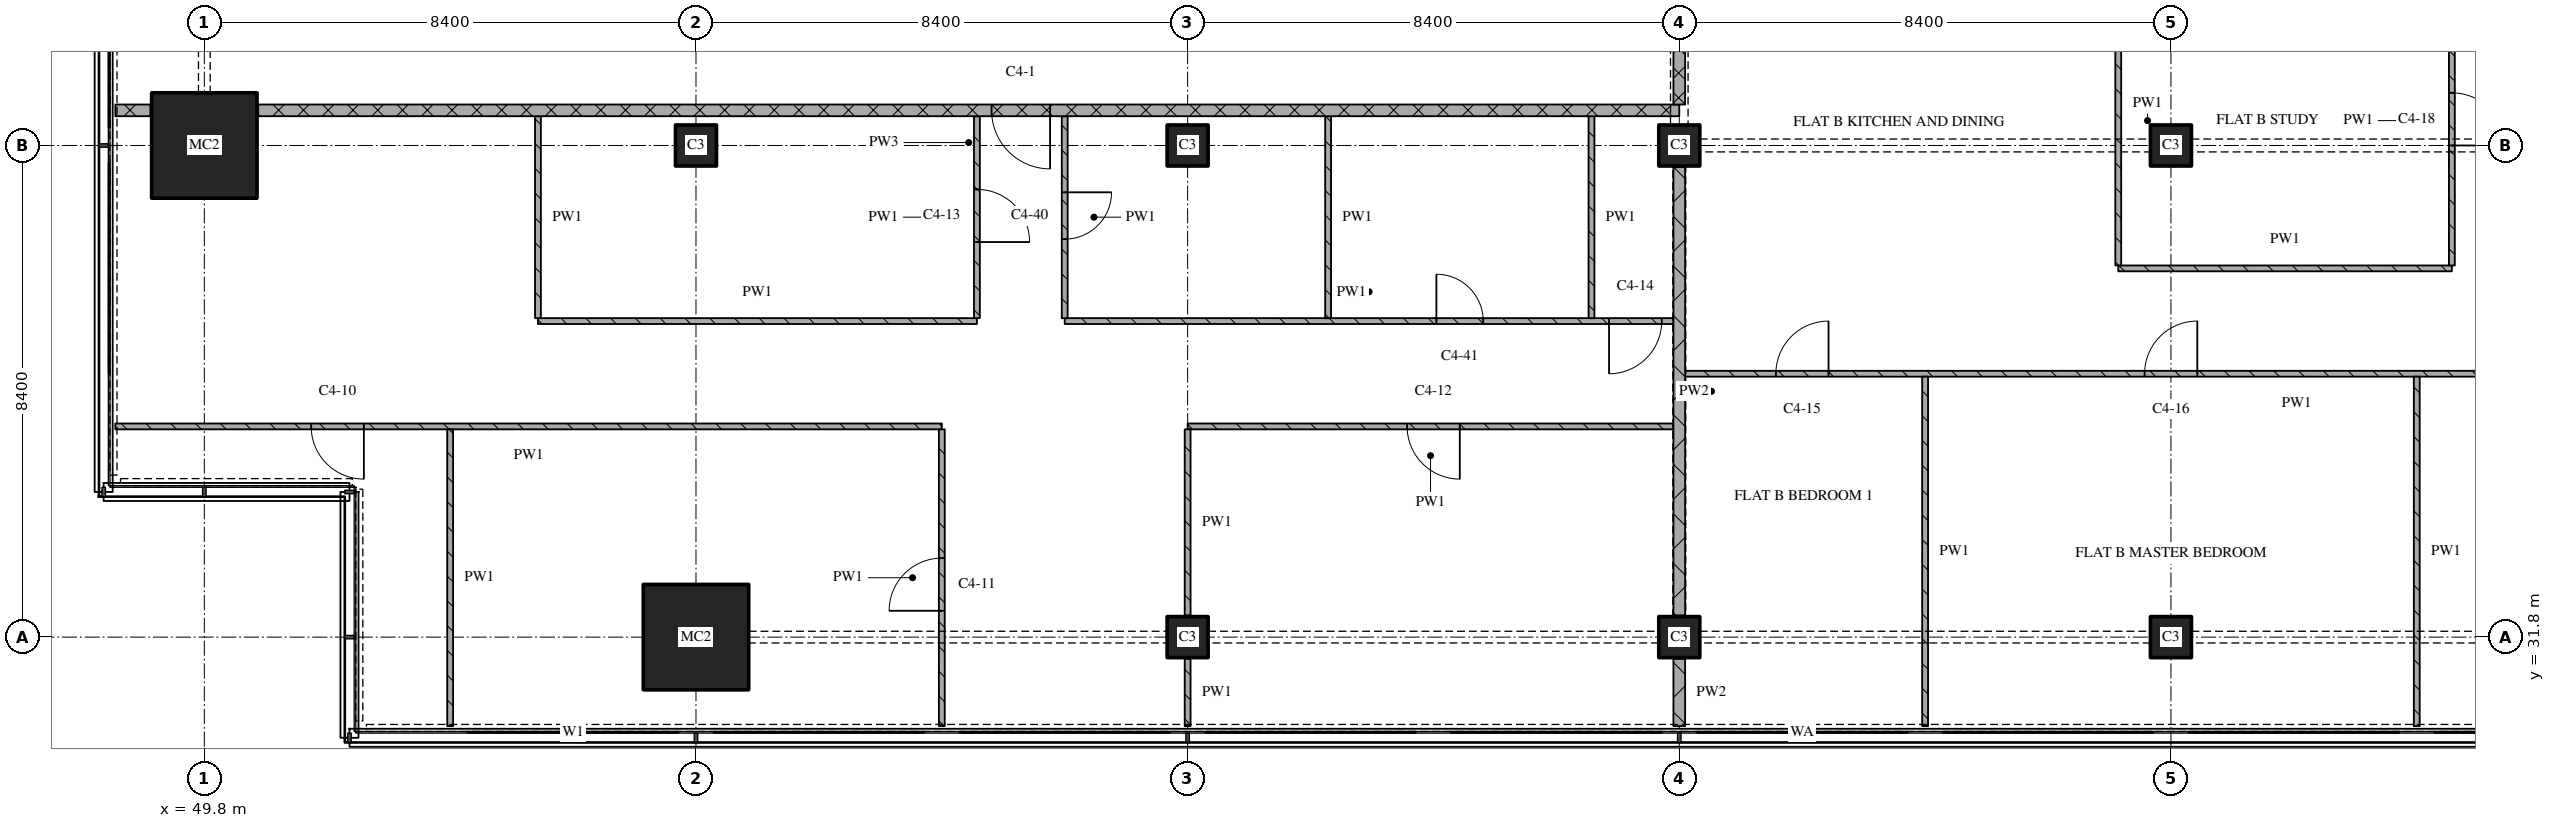
"""IFC4 building model, lengths in metres.
Left out: names, types, materials, properties, quantities, classifications, styles, units other than length and angle.
Written with IfcOpenShell. Run it as: python <this file> out.ifc"""

import sys

from ifc_helpers import new_model, si_unit, direction, frame, frame_2d, origin, origin_2d, place, context, subcontext, project, spatial, rectangle, extrude, element, fill, save


model = new_model("IFC4")
c1 = context("Model", 3, precision=1e-05, world=origin(), true_north=direction((0.0, 1.0)))
c2 = subcontext(c1, "Body", "Model", "MODEL_VIEW")
j1 = project(units=[si_unit("LENGTHUNIT", "METRE"), si_unit("PLANEANGLEUNIT", "RADIAN")], contexts=[c1])
p1 = place(None, origin())
s1 = spatial("IfcSite", under=j1, at=p1, CompositionType="ELEMENT")
p2 = place(p1, origin())
s2 = spatial("IfcBuilding", under=s1, at=p2, CompositionType="ELEMENT")
p3 = place(p2, frame((0.0, 0.0, 183.45)))
s3 = spatial("IfcBuildingStorey", under=s2, at=p3, CompositionType="ELEMENT", Elevation=183.45)
for number, where, z_axis, x_axis in (
    (1, (49.8, 40.2, 0.0), (0.0, 0.0, 1.0), (1.0, 0.0, 0.0)),
    (2, (58.2, 31.8, 0.0), (0.0, 0.0, 1.0), (1.0, 0.0, 0.0)),
):
    element("IfcColumn", number, at=place(p3, frame(where, z_axis=z_axis, x_axis=x_axis)), inside=s3, PredefinedType="COLUMN", context=c2, shape_type="SweptSolid", body=[
        extrude(rectangle(XDim=1.8, YDim=1.8, at=origin_2d()), origin(), (0.0, 0.0, 1.0), 3.6),
    ])
for number, where, z_axis, x_axis in (
    (3, (58.2, 40.2, 0.0), (0.0, 0.0, 1.0), (1.0, 0.0, 0.0)),
    (4, (66.6, 31.8, 0.0), (0.0, 0.0, 1.0), (1.0, 0.0, 0.0)),
    (5, (66.6, 40.2, 0.0), (0.0, 0.0, 1.0), (1.0, 0.0, 0.0)),
    (6, (75.0, 31.8, 0.0), (0.0, 0.0, 1.0), (1.0, 0.0, 0.0)),
    (7, (75.0, 40.2, 0.0), (0.0, 0.0, 1.0), (1.0, 0.0, 0.0)),
    (8, (83.4, 31.8, 0.0), (0.0, 0.0, 1.0), (1.0, 0.0, 0.0)),
    (9, (83.4, 40.2, 0.0), (0.0, 0.0, 1.0), (1.0, 0.0, 0.0)),
):
    element("IfcColumn", number, at=place(p3, frame(where, z_axis=z_axis, x_axis=x_axis)), inside=s3, PredefinedType="COLUMN", context=c2, shape_type="SweptSolid", body=[
        extrude(rectangle(XDim=0.7, YDim=0.7, at=origin_2d()), origin(), (0.0, 0.0, 1.0), 3.6),
    ])
p4 = place(p3, frame((62.4, 35.4, 0.0), z_axis=(0.0, 0.0, 1.0), x_axis=(-1.0, 0.0, 0.0)))
e10 = element("IfcWall", 10, at=p4, inside=s3, PredefinedType="PARTITIONING", context=c2, shape_type="SweptSolid", body=[
    extrude(rectangle(XDim=14.12, YDim=0.1, at=frame_2d((7.06, 0.0))), origin(), (0.0, 0.0, 1.0), 3.32),
])
p5 = place(p4, frame((9.875, 0.0, 0.0)))
e11 = element("IfcOpeningElement", 11, at=p5, cuts=e10, PredefinedType="OPENING", context=c2, shape_type="SweptSolid", body=[
    extrude(rectangle(XDim=0.9, YDim=2.1, at=frame_2d((0.45, 1.05))), frame((0.0, 0.06, 0.0), z_axis=(0.0, -1.0, 0.0), x_axis=(1.0, 0.0, 0.0)), (0.0, 0.0, 1.0), 0.12),
])
p6 = place(p3, frame((74.9, 35.4, 0.0), z_axis=(0.0, 0.0, 1.0), x_axis=(-1.0, 0.0, 0.0)))
e12 = element("IfcWall", 12, at=p6, inside=s3, PredefinedType="PARTITIONING", context=c2, shape_type="SweptSolid", body=[
    extrude(rectangle(XDim=8.3, YDim=0.1, at=frame_2d((4.15, 0.0))), origin(), (0.0, 0.0, 1.0), 3.32),
])
p7 = place(p6, frame((3.65, 0.0, 0.0)))
e13 = element("IfcOpeningElement", 13, at=p7, cuts=e12, PredefinedType="OPENING", context=c2, shape_type="SweptSolid", body=[
    extrude(rectangle(XDim=0.9, YDim=2.1, at=frame_2d((0.45, 1.05))), frame((0.0, 0.06, 0.0), z_axis=(0.0, -1.0, 0.0), x_axis=(1.0, 0.0, 0.0)), (0.0, 0.0, 1.0), 0.12),
])
p8 = place(p3, frame((96.0, 36.3, 0.0), z_axis=(0.0, 0.0, 1.0), x_axis=(-1.0, 0.0, 0.0)))
e14 = element("IfcWall", 14, at=p8, inside=s3, PredefinedType="PARTITIONING", context=c2, shape_type="SweptSolid", body=[
    extrude(rectangle(XDim=20.9, YDim=0.1, at=frame_2d((10.45, 0.0))), origin(), (0.0, 0.0, 1.0), 3.32),
])
p9 = place(p8, frame((12.15, 0.0, 0.0)))
e15 = element("IfcOpeningElement", 15, at=p9, cuts=e14, PredefinedType="OPENING", context=c2, shape_type="SweptSolid", body=[
    extrude(rectangle(XDim=0.9, YDim=2.1, at=frame_2d((0.45, 1.05))), frame((0.0, 0.06, 0.0), z_axis=(0.0, -1.0, 0.0), x_axis=(1.0, 0.0, 0.0)), (0.0, 0.0, 1.0), 0.12),
])
p10 = place(p8, frame((18.45, 0.0, 0.0)))
e16 = element("IfcOpeningElement", 16, at=p10, cuts=e14, PredefinedType="OPENING", context=c2, shape_type="SweptSolid", body=[
    extrude(rectangle(XDim=0.9, YDim=2.1, at=frame_2d((0.45, 1.05))), frame((0.0, 0.06, 0.0), z_axis=(0.0, -1.0, 0.0), x_axis=(1.0, 0.0, 0.0)), (0.0, 0.0, 1.0), 0.12),
])
p11 = place(p3, frame((55.5, 37.2, 0.0), z_axis=(0.0, 0.0, 1.0), x_axis=(1.0, 0.0, 0.0)))
e17 = element("IfcWall", 17, at=p11, inside=s3, PredefinedType="PARTITIONING", context=c2, shape_type="SweptSolid", body=[
    extrude(rectangle(XDim=7.5, YDim=0.1, at=frame_2d((3.75, 0.0))), origin(), (0.0, 0.0, 1.0), 3.32),
])
p12 = place(p3, frame((64.5, 37.2, 0.0), z_axis=(0.0, 0.0, 1.0), x_axis=(1.0, 0.0, 0.0)))
e18 = element("IfcWall", 18, at=p12, inside=s3, PredefinedType="PARTITIONING", context=c2, shape_type="SweptSolid", body=[
    extrude(rectangle(XDim=10.4, YDim=0.1, at=frame_2d((5.2, 0.0))), origin(), (0.0, 0.0, 1.0), 3.32),
])
p13 = place(p12, frame((6.35, 0.0, 0.0)))
e19 = element("IfcOpeningElement", 19, at=p13, cuts=e18, PredefinedType="OPENING", context=c2, shape_type="SweptSolid", body=[
    extrude(rectangle(XDim=0.8, YDim=2.1, at=frame_2d((0.4, 1.05))), frame((0.0, 0.06, 0.0), z_axis=(0.0, -1.0, 0.0), x_axis=(1.0, 0.0, 0.0)), (0.0, 0.0, 1.0), 0.12),
])
p14 = place(p12, frame((9.3, 0.0, 0.0)))
e20 = element("IfcOpeningElement", 20, at=p14, cuts=e18, PredefinedType="OPENING", context=c2, shape_type="SweptSolid", body=[
    extrude(rectangle(XDim=0.9, YDim=2.1, at=frame_2d((0.45, 1.05))), frame((0.0, 0.06, 0.0), z_axis=(0.0, -1.0, 0.0), x_axis=(1.0, 0.0, 0.0)), (0.0, 0.0, 1.0), 0.12),
])
p15 = place(p3, frame((82.5, 38.1, 0.0), z_axis=(0.0, 0.0, 1.0), x_axis=(1.0, 0.0, 0.0)))
e21 = element("IfcWall", 21, at=p15, inside=s3, PredefinedType="PARTITIONING", context=c2, shape_type="SweptSolid", body=[
    extrude(rectangle(XDim=5.7, YDim=0.1, at=frame_2d((2.85, 0.0))), origin(), (0.0, 0.0, 1.0), 3.32),
])
p16 = place(p3, frame((48.28, 40.8, 0.0), z_axis=(0.0, 0.0, 1.0), x_axis=(1.0, 0.0, 0.0)))
e22 = element("IfcWall", 22, at=p16, inside=s3, PredefinedType="PARTITIONING", context=c2, shape_type="SweptSolid", body=[
    extrude(rectangle(XDim=0.6, YDim=0.2, at=frame_2d((0.3, 0.0))), origin(), (0.0, 0.0, 1.0), 3.32),
])
p17 = place(p3, frame((75.0, 40.8, 0.0), z_axis=(0.0, 0.0, 1.0), x_axis=(-1.0, 0.0, 0.0)))
e23 = element("IfcWall", 23, at=p17, inside=s3, PredefinedType="PARTITIONING", context=c2, shape_type="SweptSolid", body=[
    extrude(rectangle(XDim=24.28, YDim=0.2, at=frame_2d((12.14, 0.0))), origin(), (0.0, 0.0, 1.0), 3.32),
])
p18 = place(p17, frame((10.75, 0.0, 0.0)))
e24 = element("IfcOpeningElement", 24, at=p18, cuts=e23, PredefinedType="OPENING", context=c2, shape_type="SweptSolid", body=[
    extrude(rectangle(XDim=1.0, YDim=2.1, at=frame_2d((0.5, 1.05))), frame((0.0, 0.11, 0.0), z_axis=(0.0, -1.0, 0.0), x_axis=(1.0, 0.0, 0.0)), (0.0, 0.0, 1.0), 0.22),
])
p19 = place(p3, frame((54.0, 35.35, 0.0), z_axis=(0.0, 0.0, 1.0), x_axis=(0.0, -1.0, 0.0)))
e25 = element("IfcWall", 25, at=p19, inside=s3, PredefinedType="PARTITIONING", context=c2, shape_type="SweptSolid", body=[
    extrude(rectangle(XDim=5.07, YDim=0.1, at=frame_2d((2.535, 0.0))), origin(), (0.0, 0.0, 1.0), 3.32),
])
p20 = place(p3, frame((55.5, 40.7, 0.0), z_axis=(0.0, 0.0, 1.0), x_axis=(0.0, -1.0, 0.0)))
e26 = element("IfcWall", 26, at=p20, inside=s3, PredefinedType="PARTITIONING", context=c2, shape_type="SweptSolid", body=[
    extrude(rectangle(XDim=3.45, YDim=0.1, at=frame_2d((1.725, 0.0))), origin(), (0.0, 0.0, 1.0), 3.32),
])
p21 = place(p3, frame((62.4, 30.28, 0.0), z_axis=(0.0, 0.0, 1.0), x_axis=(0.0, 1.0, 0.0)))
e27 = element("IfcWall", 27, at=p21, inside=s3, PredefinedType="PARTITIONING", context=c2, shape_type="SweptSolid", body=[
    extrude(rectangle(XDim=5.07, YDim=0.1, at=frame_2d((2.535, 0.0))), origin(), (0.0, 0.0, 1.0), 3.32),
])
p22 = place(p21, frame((1.97, 0.0, 0.0)))
e28 = element("IfcOpeningElement", 28, at=p22, cuts=e27, PredefinedType="OPENING", context=c2, shape_type="SweptSolid", body=[
    extrude(rectangle(XDim=0.9, YDim=2.1, at=frame_2d((0.45, 1.05))), frame((0.0, 0.06, 0.0), z_axis=(0.0, -1.0, 0.0), x_axis=(1.0, 0.0, 0.0)), (0.0, 0.0, 1.0), 0.12),
])
p23 = place(p3, frame((63.0, 37.25, 0.0), z_axis=(0.0, 0.0, 1.0), x_axis=(0.0, 1.0, 0.0)))
e29 = element("IfcWall", 29, at=p23, inside=s3, PredefinedType="PARTITIONING", context=c2, shape_type="SweptSolid", body=[
    extrude(rectangle(XDim=3.45, YDim=0.1, at=frame_2d((1.725, 0.0))), origin(), (0.0, 0.0, 1.0), 3.32),
])
p24 = place(p23, frame((1.3, 0.0, 0.0)))
e30 = element("IfcOpeningElement", 30, at=p24, cuts=e29, PredefinedType="OPENING", context=c2, shape_type="SweptSolid", body=[
    extrude(rectangle(XDim=0.9, YDim=2.1, at=frame_2d((0.45, 1.05))), frame((0.0, 0.06, 0.0), z_axis=(0.0, -1.0, 0.0), x_axis=(1.0, 0.0, 0.0)), (0.0, 0.0, 1.0), 0.12),
])
p25 = place(p3, frame((64.5, 40.7, 0.0), z_axis=(0.0, 0.0, 1.0), x_axis=(0.0, -1.0, 0.0)))
e31 = element("IfcWall", 31, at=p25, inside=s3, PredefinedType="PARTITIONING", context=c2, shape_type="SweptSolid", body=[
    extrude(rectangle(XDim=3.45, YDim=0.1, at=frame_2d((1.725, 0.0))), origin(), (0.0, 0.0, 1.0), 3.32),
])
p26 = place(p25, frame((1.3, 0.0, 0.0)))
e32 = element("IfcOpeningElement", 32, at=p26, cuts=e31, PredefinedType="OPENING", context=c2, shape_type="SweptSolid", body=[
    extrude(rectangle(XDim=0.8, YDim=2.1, at=frame_2d((0.4, 1.05))), frame((0.0, 0.06, 0.0), z_axis=(0.0, -1.0, 0.0), x_axis=(1.0, 0.0, 0.0)), (0.0, 0.0, 1.0), 0.12),
])
p27 = place(p3, frame((66.6, 31.43, 0.0), z_axis=(0.0, 0.0, 1.0), x_axis=(0.0, -1.0, 0.0)))
e33 = element("IfcWall", 33, at=p27, inside=s3, PredefinedType="PARTITIONING", context=c2, shape_type="SweptSolid", body=[
    extrude(rectangle(XDim=1.15, YDim=0.1, at=frame_2d((0.575, 0.0))), origin(), (0.0, 0.0, 1.0), 3.32),
])
p28 = place(p3, frame((66.6, 35.35, 0.0), z_axis=(0.0, 0.0, 1.0), x_axis=(0.0, -1.0, 0.0)))
e34 = element("IfcWall", 34, at=p28, inside=s3, PredefinedType="PARTITIONING", context=c2, shape_type="SweptSolid", body=[
    extrude(rectangle(XDim=3.18, YDim=0.1, at=frame_2d((1.59, 0.0))), origin(), (0.0, 0.0, 1.0), 3.32),
])
for number, where, z_axis, x_axis in (
    (35, (69.0, 40.7, 0.0), (0.0, 0.0, 1.0), (0.0, -1.0, 0.0)),
    (36, (73.5, 40.7, 0.0), (0.0, 0.0, 1.0), (0.0, -1.0, 0.0)),
):
    element("IfcWall", number, at=place(p3, frame(where, z_axis=z_axis, x_axis=x_axis)), inside=s3, PredefinedType="PARTITIONING", context=c2, shape_type="SweptSolid", body=[
        extrude(rectangle(XDim=3.45, YDim=0.1, at=frame_2d((1.725, 0.0))), origin(), (0.0, 0.0, 1.0), 3.32),
    ])
p29 = place(p3, frame((75.0, 43.1, 0.0), z_axis=(0.0, 0.0, 1.0), x_axis=(0.0, -1.0, 0.0)))
e37 = element("IfcWall", 37, at=p29, inside=s3, PredefinedType="PARTITIONING", context=c2, shape_type="SweptSolid", body=[
    extrude(rectangle(XDim=2.2, YDim=0.2, at=frame_2d((1.1, 0.0))), origin(), (0.0, 0.0, 1.0), 2.43),
])
p30 = place(p3, frame((75.0, 31.43, 0.0), z_axis=(0.0, 0.0, 1.0), x_axis=(0.0, -1.0, 0.0)))
e38 = element("IfcWall", 38, at=p30, inside=s3, PredefinedType="PARTITIONING", context=c2, shape_type="SweptSolid", body=[
    extrude(rectangle(XDim=1.15, YDim=0.2, at=frame_2d((0.575, 0.0))), origin(), (0.0, 0.0, 1.0), 3.32),
])
p31 = place(p3, frame((75.0, 39.83, 0.0), z_axis=(0.0, 0.0, 1.0), x_axis=(0.0, -1.0, 0.0)))
e39 = element("IfcWall", 39, at=p31, inside=s3, PredefinedType="PARTITIONING", context=c2, shape_type="SweptSolid", body=[
    extrude(rectangle(XDim=7.66, YDim=0.2, at=frame_2d((3.83, 0.0))), origin(), (0.0, 0.0, 1.0), 2.72),
])
p32 = place(p3, frame((79.2, 36.25, 0.0), z_axis=(0.0, 0.0, 1.0), x_axis=(0.0, -1.0, 0.0)))
e40 = element("IfcWall", 40, at=p32, inside=s3, PredefinedType="PARTITIONING", context=c2, shape_type="SweptSolid", body=[
    extrude(rectangle(XDim=5.97, YDim=0.1, at=frame_2d((2.985, 0.0))), origin(), (0.0, 0.0, 1.0), 3.32),
])
p33 = place(p3, frame((82.5, 43.1, 0.0), z_axis=(0.0, 0.0, 1.0), x_axis=(0.0, -1.0, 0.0)))
e41 = element("IfcWall", 41, at=p33, inside=s3, PredefinedType="PARTITIONING", context=c2, shape_type="SweptSolid", body=[
    extrude(rectangle(XDim=4.95, YDim=0.1, at=frame_2d((2.475, 0.0))), origin(), (0.0, 0.0, 1.0), 3.32),
])
p34 = place(p3, frame((87.6, 36.25, 0.0), z_axis=(0.0, 0.0, 1.0), x_axis=(0.0, -1.0, 0.0)))
e42 = element("IfcWall", 42, at=p34, inside=s3, PredefinedType="PARTITIONING", context=c2, shape_type="SweptSolid", body=[
    extrude(rectangle(XDim=5.97, YDim=0.1, at=frame_2d((2.985, 0.0))), origin(), (0.0, 0.0, 1.0), 3.32),
])
p35 = place(p3, frame((88.2, 38.15, 0.0), z_axis=(0.0, 0.0, 1.0), x_axis=(0.0, 1.0, 0.0)))
e43 = element("IfcWall", 43, at=p35, inside=s3, PredefinedType="PARTITIONING", context=c2, shape_type="SweptSolid", body=[
    extrude(rectangle(XDim=4.95, YDim=0.1, at=frame_2d((2.475, 0.0))), origin(), (0.0, 0.0, 1.0), 3.32),
])
p36 = place(p35, frame((2.05, 0.0, 0.0)))
e44 = element("IfcOpeningElement", 44, at=p36, cuts=e43, PredefinedType="OPENING", context=c2, shape_type="SweptSolid", body=[
    extrude(rectangle(XDim=0.9, YDim=2.1, at=frame_2d((0.45, 1.05))), frame((0.0, 0.06, 0.0), z_axis=(0.0, -1.0, 0.0), x_axis=(1.0, 0.0, 0.0)), (0.0, 0.0, 1.0), 0.12),
])
p37 = place(p5, origin())
e45 = element("IfcDoor", 45, at=p37, inside=s3, OperationType="SINGLE_SWING_LEFT", PredefinedType="DOOR", context=c2, shape_type="SweptSolid", body=[
    extrude(rectangle(XDim=0.9, YDim=2.1, at=frame_2d((0.45, 1.05))), frame((0.0, 0.025, 0.0), z_axis=(0.0, -1.0, 0.0), x_axis=(1.0, 0.0, 0.0)), (0.0, 0.0, 1.0), 0.05),
])
fill(e11, e45)
p38 = place(p7, origin())
e46 = element("IfcDoor", 46, at=p38, inside=s3, OperationType="SINGLE_SWING_LEFT", PredefinedType="DOOR", context=c2, shape_type="SweptSolid", body=[
    extrude(rectangle(XDim=0.9, YDim=2.1, at=frame_2d((0.45, 1.05))), frame((0.0, 0.025, 0.0), z_axis=(0.0, -1.0, 0.0), x_axis=(1.0, 0.0, 0.0)), (0.0, 0.0, 1.0), 0.05),
])
fill(e13, e46)
p39 = place(p9, origin())
e47 = element("IfcDoor", 47, at=p39, inside=s3, OperationType="SINGLE_SWING_RIGHT", PredefinedType="DOOR", context=c2, shape_type="SweptSolid", body=[
    extrude(rectangle(XDim=0.9, YDim=2.1, at=frame_2d((0.45, 1.05))), frame((0.0, 0.025, 0.0), z_axis=(0.0, -1.0, 0.0), x_axis=(1.0, 0.0, 0.0)), (0.0, 0.0, 1.0), 0.05),
])
fill(e15, e47)
p40 = place(p10, origin())
e48 = element("IfcDoor", 48, at=p40, inside=s3, OperationType="SINGLE_SWING_RIGHT", PredefinedType="DOOR", context=c2, shape_type="SweptSolid", body=[
    extrude(rectangle(XDim=0.9, YDim=2.1, at=frame_2d((0.45, 1.05))), frame((0.0, 0.025, 0.0), z_axis=(0.0, -1.0, 0.0), x_axis=(1.0, 0.0, 0.0)), (0.0, 0.0, 1.0), 0.05),
])
fill(e16, e48)
p41 = place(p13, origin())
e49 = element("IfcDoor", 49, at=p41, inside=s3, OperationType="SINGLE_SWING_LEFT", PredefinedType="DOOR", context=c2, shape_type="SweptSolid", body=[
    extrude(rectangle(XDim=0.8, YDim=2.1, at=frame_2d((0.4, 1.05))), frame((0.0, 0.025, 0.0), z_axis=(0.0, -1.0, 0.0), x_axis=(1.0, 0.0, 0.0)), (0.0, 0.0, 1.0), 0.05),
])
fill(e19, e49)
p42 = place(p14, origin())
e50 = element("IfcDoor", 50, at=p42, inside=s3, OperationType="SINGLE_SWING_RIGHT", PredefinedType="DOOR", context=c2, shape_type="SweptSolid", body=[
    extrude(rectangle(XDim=0.9, YDim=2.1, at=frame_2d((0.45, 1.05))), frame((0.0, 0.025, 0.0), z_axis=(0.0, -1.0, 0.0), x_axis=(1.0, 0.0, 0.0)), (0.0, 0.0, 1.0), 0.05),
])
fill(e20, e50)
p43 = place(p18, origin())
e51 = element("IfcDoor", 51, at=p43, inside=s3, OperationType="SINGLE_SWING_LEFT", PredefinedType="DOOR", context=c2, shape_type="SweptSolid", body=[
    extrude(rectangle(XDim=1.0, YDim=2.1, at=frame_2d((0.5, 1.05))), frame((0.0, 0.025, 0.0), z_axis=(0.0, -1.0, 0.0), x_axis=(1.0, 0.0, 0.0)), (0.0, 0.0, 1.0), 0.05),
])
fill(e24, e51)
p44 = place(p22, origin())
e52 = element("IfcDoor", 52, at=p44, inside=s3, OperationType="SINGLE_SWING_LEFT", PredefinedType="DOOR", context=c2, shape_type="SweptSolid", body=[
    extrude(rectangle(XDim=0.9, YDim=2.1, at=frame_2d((0.45, 1.05))), frame((0.0, 0.025, 0.0), z_axis=(0.0, -1.0, 0.0), x_axis=(1.0, 0.0, 0.0)), (0.0, 0.0, 1.0), 0.05),
])
fill(e28, e52)
p45 = place(p24, origin())
e53 = element("IfcDoor", 53, at=p45, inside=s3, OperationType="SINGLE_SWING_RIGHT", PredefinedType="DOOR", context=c2, shape_type="SweptSolid", body=[
    extrude(rectangle(XDim=0.9, YDim=2.1, at=frame_2d((0.45, 1.05))), frame((0.0, 0.025, 0.0), z_axis=(0.0, -1.0, 0.0), x_axis=(1.0, 0.0, 0.0)), (0.0, 0.0, 1.0), 0.05),
])
fill(e30, e53)
p46 = place(p26, origin())
e54 = element("IfcDoor", 54, at=p46, inside=s3, OperationType="SINGLE_SWING_LEFT", PredefinedType="DOOR", context=c2, shape_type="SweptSolid", body=[
    extrude(rectangle(XDim=0.8, YDim=2.1, at=frame_2d((0.4, 1.05))), frame((0.0, 0.025, 0.0), z_axis=(0.0, -1.0, 0.0), x_axis=(1.0, 0.0, 0.0)), (0.0, 0.0, 1.0), 0.05),
])
fill(e32, e54)
p47 = place(p36, origin())
e55 = element("IfcDoor", 55, at=p47, inside=s3, OperationType="SINGLE_SWING_RIGHT", PredefinedType="DOOR", context=c2, shape_type="SweptSolid", body=[
    extrude(rectangle(XDim=0.9, YDim=2.1, at=frame_2d((0.45, 1.05))), frame((0.0, 0.025, 0.0), z_axis=(0.0, -1.0, 0.0), x_axis=(1.0, 0.0, 0.0)), (0.0, 0.0, 1.0), 0.05),
])
fill(e44, e55)
save(model, sys.argv[1])
